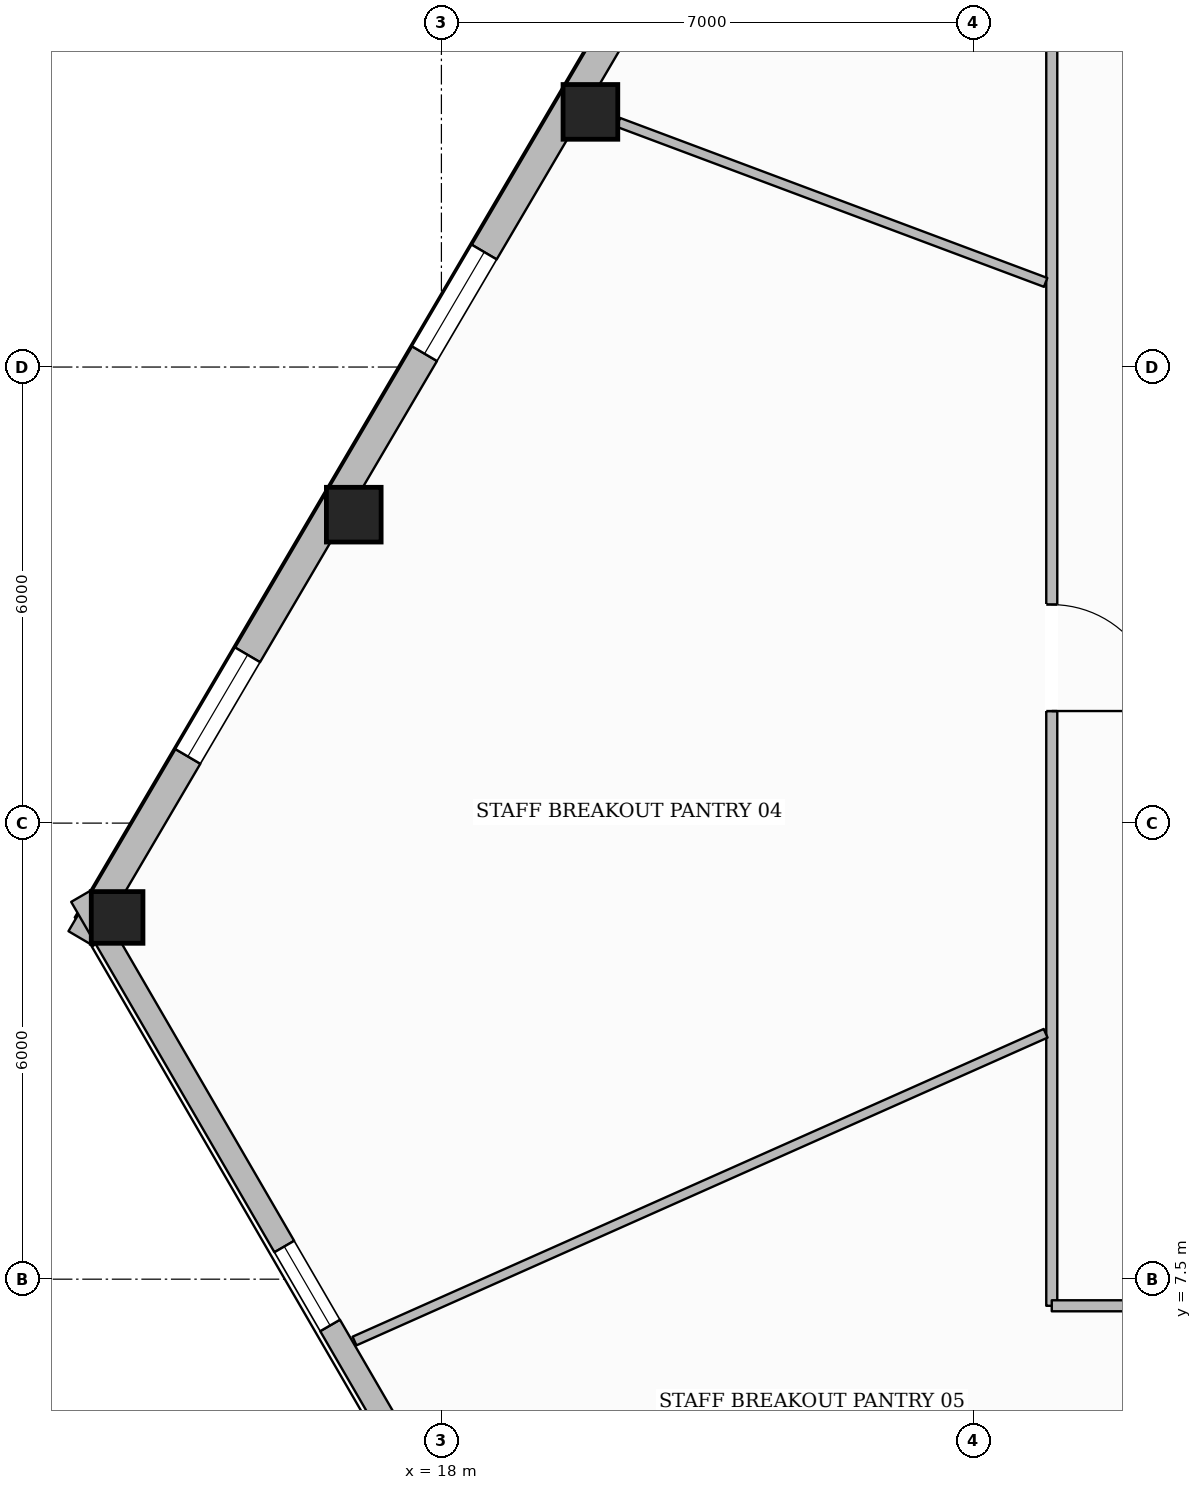
"""IFC4 building model, lengths in metres.
Left out: names, types, materials, properties, quantities, classifications, styles, units other than length and angle.
Written with IfcOpenShell. Run it as: python <this file> out.ifc"""

import sys

from ifc_helpers import new_model, si_unit, direction, frame, frame_2d, origin, origin_2d, place, context, subcontext, project, spatial, rectangle, hollow_rectangle, extrude, element, fill, save


model = new_model("IFC4")
c1 = context("Model", 3, precision=1e-05, world=origin(), true_north=direction((0.0, 1.0)))
c2 = subcontext(c1, "Body", "Model", "MODEL_VIEW")
j1 = project(units=[si_unit("LENGTHUNIT", "METRE"), si_unit("PLANEANGLEUNIT", "RADIAN")], contexts=[c1])
p1 = place(None, origin())
s1 = spatial("IfcSite", under=j1, at=p1, CompositionType="ELEMENT")
p2 = place(p1, origin())
s2 = spatial("IfcBuilding", under=s1, at=p2, CompositionType="ELEMENT")
p3 = place(p2, frame((0.0, 0.0, 139.4)))
s3 = spatial("IfcBuildingStorey", under=s2, at=p3, CompositionType="ELEMENT", Elevation=139.4)
for number, where, z_axis, x_axis in (
    (1, (19.96, 22.857, 0.0), (0.0, 0.0, 1.0), (1.0, 0.0, 0.0)),
    (2, (16.847, 17.558, 0.0), (0.0, 0.0, 1.0), (1.0, 0.0, 0.0)),
):
    element("IfcColumn", number, at=place(p3, frame(where, z_axis=z_axis, x_axis=x_axis)), inside=s3, PredefinedType="COLUMN", context=c2, shape_type="SweptSolid", body=[
        extrude(hollow_rectangle(XDim=0.72, YDim=0.72, WallThickness=0.032, at=origin_2d()), origin(), (0.0, 0.0, 1.0), 3.6),
    ])
p4 = place(p3, frame((13.733, 12.259, 0.0), z_axis=(0.0, 0.0, 1.0), x_axis=(1.0, 0.0, 0.0)))
e3 = element("IfcColumn", 3, at=p4, inside=s3, PredefinedType="COLUMN", context=c2, shape_type="SweptSolid", body=[
    extrude(hollow_rectangle(XDim=0.68, YDim=0.68, WallThickness=0.03, at=origin_2d()), origin(), (0.0, 0.0, 1.0), 3.6),
])
p5 = place(p3, frame((13.257, 11.982, 0.0), z_axis=(0.0, 0.0, 1.0), x_axis=(0.506593608381, 0.862184966204, 0.0)))
e4 = element("IfcWall", 4, at=p5, inside=s3, PredefinedType="STANDARD", context=c2, shape_type="SweptSolid", body=[
    extrude(rectangle(XDim=37.828, YDim=0.38, at=frame_2d((18.914, 0.0))), origin(), (0.0, 0.0, 1.0), 3.059),
])
p6 = place(p5, frame((33.507, 0.0, 0.65)))
e5 = element("IfcOpeningElement", 5, at=p6, cuts=e4, PredefinedType="OPENING", context=c2, shape_type="SweptSolid", body=[
    extrude(rectangle(XDim=1.55, YDim=1.75, at=frame_2d((0.775, 0.875))), frame((0.0, 0.2, 0.0), z_axis=(0.0, -1.0, 0.0), x_axis=(1.0, 0.0, 0.0)), (0.0, 0.0, 1.0), 0.4),
])
p7 = place(p5, frame((27.362, 0.0, 0.65)))
e6 = element("IfcOpeningElement", 6, at=p7, cuts=e4, PredefinedType="OPENING", context=c2, shape_type="SweptSolid", body=[
    extrude(rectangle(XDim=1.55, YDim=1.75, at=frame_2d((0.775, 0.875))), frame((0.0, 0.2, 0.0), z_axis=(0.0, -1.0, 0.0), x_axis=(1.0, 0.0, 0.0)), (0.0, 0.0, 1.0), 0.4),
])
p8 = place(p5, frame((15.07, 0.0, 0.65)))
e7 = element("IfcOpeningElement", 7, at=p8, cuts=e4, PredefinedType="OPENING", context=c2, shape_type="SweptSolid", body=[
    extrude(rectangle(XDim=1.55, YDim=1.75, at=frame_2d((0.775, 0.875))), frame((0.0, 0.2, 0.0), z_axis=(0.0, -1.0, 0.0), x_axis=(1.0, 0.0, 0.0)), (0.0, 0.0, 1.0), 0.4),
])
p9 = place(p5, frame((8.924, 0.0, 0.65)))
e8 = element("IfcOpeningElement", 8, at=p9, cuts=e4, PredefinedType="OPENING", context=c2, shape_type="SweptSolid", body=[
    extrude(rectangle(XDim=1.55, YDim=1.75, at=frame_2d((0.775, 0.875))), frame((0.0, 0.2, 0.0), z_axis=(0.0, -1.0, 0.0), x_axis=(1.0, 0.0, 0.0)), (0.0, 0.0, 1.0), 0.4),
])
p10 = place(p5, frame((2.778, 0.0, 0.65)))
e9 = element("IfcOpeningElement", 9, at=p10, cuts=e4, PredefinedType="OPENING", context=c2, shape_type="SweptSolid", body=[
    extrude(rectangle(XDim=1.55, YDim=1.75, at=frame_2d((0.775, 0.875))), frame((0.0, 0.2, 0.0), z_axis=(0.0, -1.0, 0.0), x_axis=(1.0, 0.0, 0.0)), (0.0, 0.0, 1.0), 0.4),
])
p11 = place(p3, frame((19.209, 2.282, 0.0), z_axis=(0.0, 0.0, 1.0), x_axis=(-0.501777863024, 0.864996518016, 0.0)))
e10 = element("IfcWall", 10, at=p11, inside=s3, PredefinedType="STANDARD", context=c2, shape_type="SweptSolid", body=[
    extrude(rectangle(XDim=11.858, YDim=0.3, at=frame_2d((5.929, 0.0))), origin(), (0.0, 0.0, 1.0), 3.059),
])
p12 = place(p11, frame((5.329, 0.0, 0.65)))
e11 = element("IfcOpeningElement", 11, at=p12, cuts=e10, PredefinedType="OPENING", context=c2, shape_type="SweptSolid", body=[
    extrude(rectangle(XDim=1.2, YDim=1.7, at=frame_2d((0.6, 0.85))), frame((0.0, 0.16, 0.0), z_axis=(0.0, -1.0, 0.0), x_axis=(1.0, 0.0, 0.0)), (0.0, 0.0, 1.0), 0.32),
])
p13 = place(p3, frame((26.03, 25.05, 0.0), z_axis=(0.0, 0.0, 1.0), x_axis=(0.0, -1.0, 0.0)))
e12 = element("IfcWall", 12, at=p13, inside=s3, PredefinedType="PARTITIONING", context=c2, shape_type="SweptSolid", body=[
    extrude(rectangle(XDim=17.9, YDim=0.145, at=frame_2d((8.95, 0.0))), origin(), (0.0, 0.0, 1.0), 3.288),
])
p14 = place(p13, frame((8.676, 0.0, 0.0)))
e13 = element("IfcOpeningElement", 13, at=p14, cuts=e12, PredefinedType="OPENING", context=c2, shape_type="SweptSolid", body=[
    extrude(rectangle(XDim=1.4, YDim=2.2, at=frame_2d((0.7, 1.1))), frame((0.0, 0.083, 0.0), z_axis=(0.0, -1.0, 0.0), x_axis=(1.0, 0.0, 0.0)), (0.0, 0.0, 1.0), 0.165),
])
p15 = place(p3, frame((26.03, 7.15, 0.0), z_axis=(0.0, 0.0, 1.0), x_axis=(1.0, 0.0, 0.0)))
e14 = element("IfcWall", 14, at=p15, inside=s3, PredefinedType="PARTITIONING", context=c2, shape_type="SweptSolid", body=[
    extrude(rectangle(XDim=23.94, YDim=0.145, at=frame_2d((11.97, 0.0))), origin(), (0.0, 0.0, 1.0), 3.6),
])
p16 = place(p15, frame((4.53, 0.0, 0.0)))
e15 = element("IfcOpeningElement", 15, at=p16, cuts=e14, PredefinedType="OPENING", context=c2, shape_type="SweptSolid", body=[
    extrude(rectangle(XDim=0.88, YDim=2.1, at=frame_2d((0.44, 1.05))), frame((0.0, 0.083, 0.0), z_axis=(0.0, -1.0, 0.0), x_axis=(1.0, 0.0, 0.0)), (0.0, 0.0, 1.0), 0.165),
])
p17 = place(p15, frame((7.05, 0.0, 0.0)))
e16 = element("IfcOpeningElement", 16, at=p17, cuts=e14, PredefinedType="OPENING", context=c2, shape_type="SweptSolid", body=[
    extrude(rectangle(XDim=0.88, YDim=2.1, at=frame_2d((0.44, 1.05))), frame((0.0, 0.083, 0.0), z_axis=(0.0, -1.0, 0.0), x_axis=(1.0, 0.0, 0.0)), (0.0, 0.0, 1.0), 0.165),
])
p18 = place(p15, frame((9.43, 0.0, 0.0)))
e17 = element("IfcOpeningElement", 17, at=p18, cuts=e14, PredefinedType="OPENING", context=c2, shape_type="SweptSolid", body=[
    extrude(rectangle(XDim=0.96, YDim=2.1, at=frame_2d((0.48, 1.05))), frame((0.0, 0.083, 0.0), z_axis=(0.0, -1.0, 0.0), x_axis=(1.0, 0.0, 0.0)), (0.0, 0.0, 1.0), 0.165),
])
p19 = place(p15, frame((14.925, 0.0, 0.0)))
e18 = element("IfcOpeningElement", 18, at=p19, cuts=e14, PredefinedType="OPENING", context=c2, shape_type="SweptSolid", body=[
    extrude(rectangle(XDim=1.4, YDim=2.2, at=frame_2d((0.7, 1.1))), frame((0.0, 0.083, 0.0), z_axis=(0.0, -1.0, 0.0), x_axis=(1.0, 0.0, 0.0)), (0.0, 0.0, 1.0), 0.165),
])
p20 = place(p3, frame((25.949, 20.614, 0.0), z_axis=(0.0, 0.0, 1.0), x_axis=(-0.936462830217, 0.350766827996, 0.0)))
e19 = element("IfcWall", 19, at=p20, inside=s3, PredefinedType="PARTITIONING", context=c2, shape_type="SweptSolid", body=[
    extrude(rectangle(XDim=6.002, YDim=0.125, at=frame_2d((3.001, 0.0))), origin(), (0.0, 0.0, 1.0), 3.6),
])
p21 = place(p3, frame((25.949, 10.735, 0.0), z_axis=(0.0, 0.0, 1.0), x_axis=(-0.913541286937, -0.406746010505, 0.0)))
e20 = element("IfcWall", 20, at=p21, inside=s3, PredefinedType="PARTITIONING", context=c2, shape_type="SweptSolid", body=[
    extrude(rectangle(XDim=9.954, YDim=0.125, at=frame_2d((4.977, 0.0))), origin(), (0.0, 0.0, 1.0), 3.6),
])
p22 = place(p9, origin())
e21 = element("IfcWindow", 21, at=p22, inside=s3, PartitioningType="SINGLE_PANEL", PredefinedType="WINDOW", context=c2, shape_type="SweptSolid", body=[
    extrude(rectangle(XDim=1.55, YDim=1.75, at=frame_2d((0.775, 0.875))), frame((0.0, 0.03, 0.0), z_axis=(0.0, -1.0, 0.0), x_axis=(1.0, 0.0, 0.0)), (0.0, 0.0, 1.0), 0.06),
])
fill(e8, e21)
p23 = place(p10, origin())
e22 = element("IfcWindow", 22, at=p23, inside=s3, PartitioningType="SINGLE_PANEL", PredefinedType="WINDOW", context=c2, shape_type="SweptSolid", body=[
    extrude(rectangle(XDim=1.55, YDim=1.75, at=frame_2d((0.775, 0.875))), frame((0.0, 0.03, 0.0), z_axis=(0.0, -1.0, 0.0), x_axis=(1.0, 0.0, 0.0)), (0.0, 0.0, 1.0), 0.06),
])
fill(e9, e22)
p24 = place(p12, origin())
e23 = element("IfcWindow", 23, at=p24, inside=s3, PartitioningType="SINGLE_PANEL", PredefinedType="WINDOW", context=c2, shape_type="SweptSolid", body=[
    extrude(rectangle(XDim=1.2, YDim=1.7, at=frame_2d((0.6, 0.85))), frame((0.0, 0.03, 0.0), z_axis=(0.0, -1.0, 0.0), x_axis=(1.0, 0.0, 0.0)), (0.0, 0.0, 1.0), 0.06),
])
fill(e11, e23)
p25 = place(p14, origin())
e24 = element("IfcDoor", 24, at=p25, inside=s3, OperationType="SINGLE_SWING_RIGHT", PredefinedType="DOOR", context=c2, shape_type="SweptSolid", body=[
    extrude(rectangle(XDim=1.4, YDim=2.2, at=frame_2d((0.7, 1.1))), frame((0.0, 0.025, 0.0), z_axis=(0.0, -1.0, 0.0), x_axis=(1.0, 0.0, 0.0)), (0.0, 0.0, 1.0), 0.05),
])
fill(e13, e24)
save(model, sys.argv[1])
